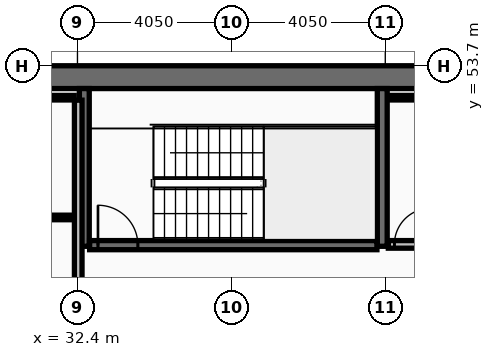
"""IFC4 building model, lengths in metres.
Left out: names, types, materials, properties, quantities, classifications, styles, units other than length and angle.
Written with IfcOpenShell. Run it as: python <this file> out.ifc"""

import sys

from ifc_helpers import new_model, si_unit, direction, frame, frame_2d, origin, place, context, subcontext, project, spatial, rectangle, extrude, element, fill, save


model = new_model("IFC4")
c1 = context("Model", 3, precision=1e-05, world=origin(), true_north=direction((0.0, 1.0)))
c2 = subcontext(c1, "Body", "Model", "MODEL_VIEW")
j1 = project(units=[si_unit("LENGTHUNIT", "METRE"), si_unit("PLANEANGLEUNIT", "RADIAN")], contexts=[c1])
p1 = place(None, origin())
s1 = spatial("IfcSite", under=j1, at=p1, CompositionType="ELEMENT")
p2 = place(p1, origin())
s2 = spatial("IfcBuilding", under=s1, at=p2, CompositionType="ELEMENT")
p3 = place(p2, frame((0.0, 0.0, 224.6)))
s3 = spatial("IfcBuildingStorey", under=s2, at=p3, CompositionType="ELEMENT", Elevation=224.6)
p4 = place(p3, frame((16.2, 53.4, 0.0), z_axis=(0.0, 0.0, 1.0), x_axis=(1.0, 0.0, 0.0)))
e1 = element("IfcWall", 1, at=p4, inside=s3, PredefinedType="SHEAR", context=c2, shape_type="SweptSolid", body=[
    extrude(rectangle(XDim=40.5, YDim=0.6, at=frame_2d((20.25, 0.0))), origin(), (0.0, 0.0, 1.0), 3.44),
])
for number, where, z_axis, x_axis in (
    (2, (32.58, 48.95, 0.0), (0.0, 0.0, 1.0), (0.0, 1.0, 0.0)),
    (3, (40.42, 48.95, 0.0), (0.0, 0.0, 1.0), (0.0, 1.0, 0.0)),
):
    element("IfcWall", number, at=place(p3, frame(where, z_axis=z_axis, x_axis=x_axis)), inside=s3, PredefinedType="SHEAR", context=c2, shape_type="SweptSolid", body=[
        extrude(rectangle(XDim=4.15, YDim=0.26, at=frame_2d((2.075, 0.0))), origin(), (0.0, 0.0, 1.0), 3.44),
    ])
p5 = place(p3, frame((32.72, 48.98, 0.0), z_axis=(0.0, 0.0, 1.0), x_axis=(1.0, 0.0, 0.0)))
e4 = element("IfcWall", 4, at=p5, inside=s3, PredefinedType="SHEAR", context=c2, shape_type="SweptSolid", body=[
    extrude(rectangle(XDim=7.56, YDim=0.24, at=frame_2d((3.78, 0.0))), origin(), (0.0, 0.0, 1.0), 3.44),
])
p6 = place(p5, frame((0.22, 0.0, 0.0)))
e5 = element("IfcOpeningElement", 5, at=p6, cuts=e4, PredefinedType="OPENING", context=c2, shape_type="SweptSolid", body=[
    extrude(rectangle(XDim=1.05, YDim=2.15, at=frame_2d((0.525, 1.075))), frame((0.0, 0.13, 0.0), z_axis=(0.0, -1.0, 0.0), x_axis=(1.0, 0.0, 0.0)), (0.0, 0.0, 1.0), 0.26),
])
p7 = place(p3, frame((32.42, 46.805, 0.0), z_axis=(0.0, 0.0, 1.0), x_axis=(0.0, 1.0, 0.0)))
e6 = element("IfcWall", 6, at=p7, inside=s3, PredefinedType="PARTITIONING", context=c2, shape_type="SweptSolid", body=[
    extrude(rectangle(XDim=5.99, YDim=0.2, at=frame_2d((2.995, 0.0))), origin(), (0.0, 0.0, 1.0), 3.44),
])
p8 = place(p3, frame((24.805, 52.86, 0.0), z_axis=(0.0, 0.0, 1.0), x_axis=(1.0, 0.0, 0.0)))
e7 = element("IfcWall", 7, at=p8, inside=s3, PredefinedType="PARTITIONING", context=c2, shape_type="SweptSolid", body=[
    extrude(rectangle(XDim=7.51, YDim=0.12, at=frame_2d((3.755, 0.0))), origin(), (0.0, 0.0, 1.0), 3.44),
])
p9 = place(p3, frame((24.805, 49.709, 0.0), z_axis=(0.0, 0.0, 1.0), x_axis=(1.0, 0.0, 0.0)))
e8 = element("IfcWall", 8, at=p9, inside=s3, PredefinedType="PARTITIONING", context=c2, shape_type="SweptSolid", body=[
    extrude(rectangle(XDim=7.51, YDim=0.12, at=frame_2d((3.755, 0.0))), origin(), (0.0, 0.0, 1.0), 3.44),
])
p10 = place(p9, frame((2.4, 0.0, 0.0)))
e9 = element("IfcOpeningElement", 9, at=p10, cuts=e8, PredefinedType="OPENING", context=c2, shape_type="SweptSolid", body=[
    extrude(rectangle(XDim=0.9, YDim=2.05, at=frame_2d((0.45, 1.025))), frame((0.0, 0.07, 0.0), z_axis=(0.0, -1.0, 0.0), x_axis=(1.0, 0.0, 0.0)), (0.0, 0.0, 1.0), 0.14),
])
p11 = place(p3, frame((40.58, 52.86, 0.0), z_axis=(0.0, 0.0, 1.0), x_axis=(1.0, 0.0, 0.0)))
e10 = element("IfcWall", 10, at=p11, inside=s3, PredefinedType="PARTITIONING", context=c2, shape_type="SweptSolid", body=[
    extrude(rectangle(XDim=7.56, YDim=0.12, at=frame_2d((3.78, 0.0))), origin(), (0.0, 0.0, 1.0), 3.44),
])
p12 = place(p3, frame((40.58, 49.0, 0.0), z_axis=(0.0, 0.0, 1.0), x_axis=(1.0, 0.0, 0.0)))
e11 = element("IfcWall", 11, at=p12, inside=s3, PredefinedType="PARTITIONING", context=c2, shape_type="SweptSolid", body=[
    extrude(rectangle(XDim=7.56, YDim=0.2, at=frame_2d((3.78, 0.0))), origin(), (0.0, 0.0, 1.0), 3.44),
])
p13 = place(p12, frame((0.16, 0.0, 0.0)))
e12 = element("IfcOpeningElement", 12, at=p13, cuts=e11, PredefinedType="OPENING", context=c2, shape_type="SweptSolid", body=[
    extrude(rectangle(XDim=0.95, YDim=2.1, at=frame_2d((0.475, 1.05))), frame((0.0, 0.11, 0.0), z_axis=(0.0, -1.0, 0.0), x_axis=(1.0, 0.0, 0.0)), (0.0, 0.0, 1.0), 0.22),
])
p14 = place(p6, origin())
e13 = element("IfcDoor", 13, at=p14, inside=s3, OperationType="SINGLE_SWING_LEFT", PredefinedType="DOOR", context=c2, shape_type="SweptSolid", body=[
    extrude(rectangle(XDim=1.05, YDim=2.15, at=frame_2d((0.525, 1.075))), frame((0.0, 0.025, 0.0), z_axis=(0.0, -1.0, 0.0), x_axis=(1.0, 0.0, 0.0)), (0.0, 0.0, 1.0), 0.05),
])
fill(e5, e13)
p15 = place(p13, origin())
e14 = element("IfcDoor", 14, at=p15, inside=s3, OperationType="SINGLE_SWING_RIGHT", PredefinedType="DOOR", context=c2, shape_type="SweptSolid", body=[
    extrude(rectangle(XDim=0.95, YDim=2.1, at=frame_2d((0.475, 1.05))), frame((0.0, 0.025, 0.0), z_axis=(0.0, -1.0, 0.0), x_axis=(1.0, 0.0, 0.0)), (0.0, 0.0, 1.0), 0.05),
])
fill(e12, e14)
save(model, sys.argv[1])
